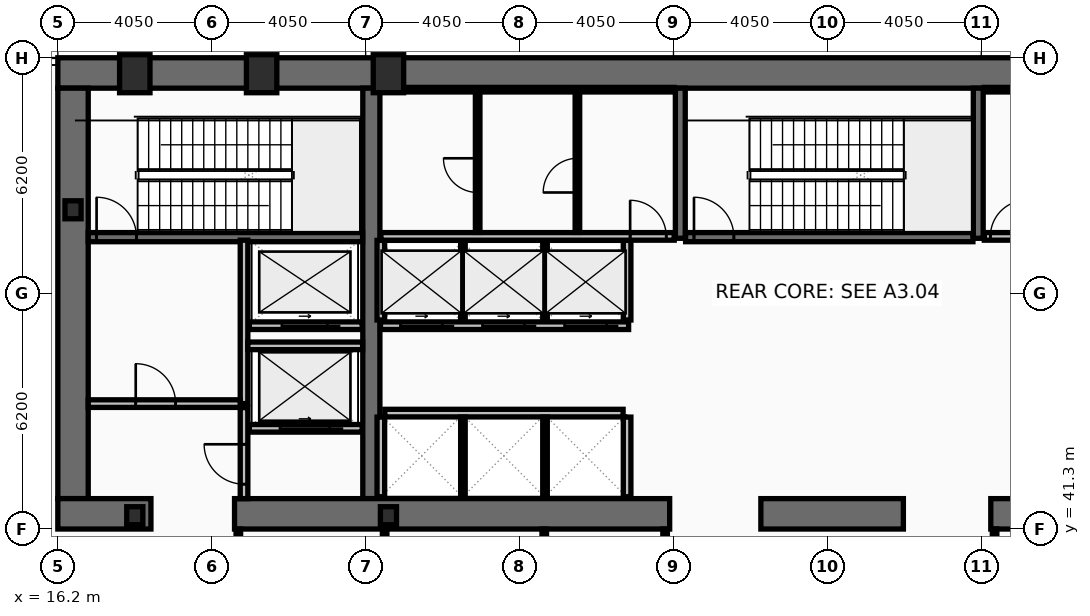
"""IFC4 building model, lengths in metres.
Left out: names, types, materials, properties, quantities, classifications, styles, units other than length and angle.
Written with IfcOpenShell. Run it as: python <this file> out.ifc"""

import sys

from ifc_helpers import new_model, si_unit, direction, frame, frame_2d, origin, origin_2d, place, context, subcontext, project, spatial, rectangle, hollow_rectangle, i_section, extrude, element, fill, save


model = new_model("IFC4")
c1 = context("Model", 3, precision=1e-05, world=origin(), true_north=direction((0.0, 1.0)))
c2 = subcontext(c1, "Body", "Model", "MODEL_VIEW")
j1 = project(units=[si_unit("LENGTHUNIT", "METRE"), si_unit("PLANEANGLEUNIT", "RADIAN")], contexts=[c1])
p1 = place(None, origin())
s1 = spatial("IfcSite", under=j1, at=p1, CompositionType="ELEMENT")
p2 = place(p1, origin())
s2 = spatial("IfcBuilding", under=s1, at=p2, CompositionType="ELEMENT")
p3 = place(p2, frame((0.0, 0.0, 10.4)))
s3 = spatial("IfcBuildingStorey", under=s2, at=p3, CompositionType="ELEMENT", Elevation=10.4)
p4 = place(p3, frame((16.2, 53.3, 0.0), z_axis=(0.0, 0.0, 1.0), x_axis=(1.0, 0.0, 0.0)))
e1 = element("IfcWall", 1, at=p4, inside=s3, PredefinedType="SHEAR", context=c2, shape_type="SweptSolid", body=[
    extrude(rectangle(XDim=40.5, YDim=0.8, at=frame_2d((20.25, 0.0))), origin(), (0.0, 0.0, 1.0), 4.8),
])
p5 = place(p3, frame((16.6, 42.1, 0.0), z_axis=(0.0, 0.0, 1.0), x_axis=(0.0, 1.0, 0.0)))
e2 = element("IfcWall", 2, at=p5, inside=s3, PredefinedType="SHEAR", context=c2, shape_type="SweptSolid", body=[
    extrude(rectangle(XDim=10.8, YDim=0.8, at=frame_2d((5.4, 0.0))), origin(), (0.0, 0.0, 1.0), 4.8),
])
p6 = place(p3, frame((24.45, 42.1, 0.0), z_axis=(0.0, 0.0, 1.0), x_axis=(0.0, 1.0, 0.0)))
e3 = element("IfcWall", 3, at=p6, inside=s3, PredefinedType="SHEAR", context=c2, shape_type="SweptSolid", body=[
    extrude(rectangle(XDim=10.8, YDim=0.45, at=frame_2d((5.4, 0.0))), origin(), (0.0, 0.0, 1.0), 4.8),
])
p7 = place(p3, frame((18.65, 41.7, 0.0), z_axis=(0.0, 0.0, 1.0), x_axis=(-1.0, 0.0, 0.0)))
e4 = element("IfcWall", 4, at=p7, inside=s3, PredefinedType="SHEAR", context=c2, shape_type="SweptSolid", body=[
    extrude(rectangle(XDim=2.45, YDim=0.8, at=frame_2d((1.225, 0.0))), origin(), (0.0, 0.0, 1.0), 4.8),
])
p8 = place(p3, frame((32.3, 41.7, 0.0), z_axis=(0.0, 0.0, 1.0), x_axis=(-1.0, 0.0, 0.0)))
e5 = element("IfcWall", 5, at=p8, inside=s3, PredefinedType="SHEAR", context=c2, shape_type="SweptSolid", body=[
    extrude(rectangle(XDim=11.45, YDim=0.8, at=frame_2d((5.725, 0.0))), origin(), (0.0, 0.0, 1.0), 4.8),
])
p9 = place(p3, frame((38.45, 41.7, 0.0), z_axis=(0.0, 0.0, 1.0), x_axis=(-1.0, 0.0, 0.0)))
e6 = element("IfcWall", 6, at=p9, inside=s3, PredefinedType="SHEAR", context=c2, shape_type="SweptSolid", body=[
    extrude(rectangle(XDim=3.75, YDim=0.8, at=frame_2d((1.875, 0.0))), origin(), (0.0, 0.0, 1.0), 4.8),
])
p10 = place(p3, frame((52.05, 41.7, 0.0), z_axis=(0.0, 0.0, 1.0), x_axis=(-1.0, 0.0, 0.0)))
e7 = element("IfcWall", 7, at=p10, inside=s3, PredefinedType="SHEAR", context=c2, shape_type="SweptSolid", body=[
    extrude(rectangle(XDim=11.3, YDim=0.8, at=frame_2d((5.65, 0.0))), origin(), (0.0, 0.0, 1.0), 4.8),
])
for number, where, z_axis, x_axis in (
    (8, (32.58, 48.95, 0.0), (0.0, 0.0, 1.0), (0.0, 1.0, 0.0)),
    (9, (40.42, 48.95, 0.0), (0.0, 0.0, 1.0), (0.0, 1.0, 0.0)),
):
    element("IfcWall", number, at=place(p3, frame(where, z_axis=z_axis, x_axis=x_axis)), inside=s3, PredefinedType="SHEAR", context=c2, shape_type="SweptSolid", body=[
        extrude(rectangle(XDim=3.95, YDim=0.26, at=frame_2d((1.975, 0.0))), origin(), (0.0, 0.0, 1.0), 4.8),
    ])
p11 = place(p3, frame((17.0, 48.98, 0.0), z_axis=(0.0, 0.0, 1.0), x_axis=(1.0, 0.0, 0.0)))
e10 = element("IfcWall", 10, at=p11, inside=s3, PredefinedType="SHEAR", context=c2, shape_type="SweptSolid", body=[
    extrude(rectangle(XDim=7.22, YDim=0.24, at=frame_2d((3.61, 0.0))), origin(), (0.0, 0.0, 1.0), 4.8),
])
p12 = place(p11, frame((0.22, 0.0, 0.0)))
e11 = element("IfcOpeningElement", 11, at=p12, cuts=e10, PredefinedType="OPENING", context=c2, shape_type="SweptSolid", body=[
    extrude(rectangle(XDim=1.05, YDim=2.15, at=frame_2d((0.525, 1.075))), frame((0.0, 0.13, 0.0), z_axis=(0.0, -1.0, 0.0), x_axis=(1.0, 0.0, 0.0)), (0.0, 0.0, 1.0), 0.26),
])
p13 = place(p3, frame((32.72, 48.98, 0.0), z_axis=(0.0, 0.0, 1.0), x_axis=(1.0, 0.0, 0.0)))
e12 = element("IfcWall", 12, at=p13, inside=s3, PredefinedType="SHEAR", context=c2, shape_type="SweptSolid", body=[
    extrude(rectangle(XDim=7.56, YDim=0.24, at=frame_2d((3.78, 0.0))), origin(), (0.0, 0.0, 1.0), 4.8),
])
p14 = place(p13, frame((0.22, 0.0, 0.0)))
e13 = element("IfcOpeningElement", 13, at=p14, cuts=e12, PredefinedType="OPENING", context=c2, shape_type="SweptSolid", body=[
    extrude(rectangle(XDim=1.05, YDim=2.15, at=frame_2d((0.525, 1.075))), frame((0.0, 0.13, 0.0), z_axis=(0.0, -1.0, 0.0), x_axis=(1.0, 0.0, 0.0)), (0.0, 0.0, 1.0), 0.26),
])
for number, where, z_axis, x_axis in (
    (14, (18.225, 53.28, 0.0), (0.0, 0.0, 1.0), (1.0, 0.0, 0.0)),
    (15, (21.562, 53.28, 0.0), (0.0, 0.0, 1.0), (1.0, 0.0, 0.0)),
    (16, (24.9, 53.28, 0.0), (0.0, 0.0, 1.0), (1.0, 0.0, 0.0)),
):
    element("IfcColumn", number, at=place(p3, frame(where, z_axis=z_axis, x_axis=x_axis)), inside=s3, PredefinedType="COLUMN", context=c2, shape_type="SweptSolid", body=[
        extrude(hollow_rectangle(XDim=0.8, YDim=1.0, WallThickness=0.055, at=origin_2d()), origin(), (0.0, 0.0, 1.0), 5.0),
    ])
for number, where, z_axis, x_axis in (
    (17, (16.6, 49.7, 0.0), (0.0, 0.0, 1.0), (1.0, 0.0, 0.0)),
    (18, (18.225, 41.65, 0.0), (0.0, 0.0, 1.0), (1.0, 0.0, 0.0)),
    (19, (24.9, 41.65, 0.0), (0.0, 0.0, 1.0), (1.0, 0.0, 0.0)),
):
    element("IfcColumn", number, at=place(p3, frame(where, z_axis=z_axis, x_axis=x_axis)), inside=s3, PredefinedType="COLUMN", context=c2, shape_type="SweptSolid", body=[
        extrude(i_section(OverallWidth=0.424, OverallDepth=0.474, WebThickness=0.048, FlangeThickness=0.077, at=origin_2d()), origin(), (0.0, 0.0, 1.0), 5.0),
    ])
p15 = place(p3, frame((24.21, 43.95, 0.0), z_axis=(0.0, 0.0, 1.0), x_axis=(-1.0, 0.0, 0.0)))
e20 = element("IfcWall", 20, at=p15, inside=s3, PredefinedType="PARTITIONING", context=c2, shape_type="SweptSolid", body=[
    extrude(rectangle(XDim=2.97, YDim=0.2, at=frame_2d((1.485, 0.0))), origin(), (0.0, 0.0, 1.0), 4.8),
])
p16 = place(p15, frame((0.86, 0.0, 0.0)))
e21 = element("IfcOpeningElement", 21, at=p16, cuts=e20, PredefinedType="OPENING", context=c2, shape_type="SweptSolid", body=[
    extrude(rectangle(XDim=1.3, YDim=2.18, at=frame_2d((0.65, 1.09))), frame((0.0, 0.11, 0.0), z_axis=(0.0, -1.0, 0.0), x_axis=(1.0, 0.0, 0.0)), (0.0, 0.0, 1.0), 0.22),
])
p17 = place(p3, frame((24.21, 46.65, 0.0), z_axis=(0.0, 0.0, 1.0), x_axis=(-1.0, 0.0, 0.0)))
e22 = element("IfcWall", 22, at=p17, inside=s3, PredefinedType="PARTITIONING", context=c2, shape_type="SweptSolid", body=[
    extrude(rectangle(XDim=2.97, YDim=0.2, at=frame_2d((1.485, 0.0))), origin(), (0.0, 0.0, 1.0), 4.8),
])
p18 = place(p17, frame((0.91, 0.0, 0.0)))
e23 = element("IfcOpeningElement", 23, at=p18, cuts=e22, PredefinedType="OPENING", context=c2, shape_type="SweptSolid", body=[
    extrude(rectangle(XDim=1.2, YDim=2.18, at=frame_2d((0.6, 1.09))), frame((0.0, 0.11, 0.0), z_axis=(0.0, -1.0, 0.0), x_axis=(1.0, 0.0, 0.0)), (0.0, 0.0, 1.0), 0.22),
])
p19 = place(p3, frame((31.22, 46.65, 0.0), z_axis=(0.0, 0.0, 1.0), x_axis=(-1.0, 0.0, 0.0)))
e24 = element("IfcWall", 24, at=p19, inside=s3, PredefinedType="PARTITIONING", context=c2, shape_type="SweptSolid", body=[
    extrude(rectangle(XDim=6.53, YDim=0.2, at=frame_2d((3.265, 0.0))), origin(), (0.0, 0.0, 1.0), 4.8),
])
p20 = place(p19, frame((4.9, 0.0, 0.0)))
e25 = element("IfcOpeningElement", 25, at=p20, cuts=e24, PredefinedType="OPENING", context=c2, shape_type="SweptSolid", body=[
    extrude(rectangle(XDim=1.1, YDim=2.18, at=frame_2d((0.55, 1.09))), frame((0.0, 0.11, 0.0), z_axis=(0.0, -1.0, 0.0), x_axis=(1.0, 0.0, 0.0)), (0.0, 0.0, 1.0), 0.22),
])
p21 = place(p19, frame((2.74, 0.0, 0.0)))
e26 = element("IfcOpeningElement", 26, at=p21, cuts=e24, PredefinedType="OPENING", context=c2, shape_type="SweptSolid", body=[
    extrude(rectangle(XDim=1.1, YDim=2.18, at=frame_2d((0.55, 1.09))), frame((0.0, 0.11, 0.0), z_axis=(0.0, -1.0, 0.0), x_axis=(1.0, 0.0, 0.0)), (0.0, 0.0, 1.0), 0.22),
])
p22 = place(p19, frame((0.58, 0.0, 0.0)))
e27 = element("IfcOpeningElement", 27, at=p22, cuts=e24, PredefinedType="OPENING", context=c2, shape_type="SweptSolid", body=[
    extrude(rectangle(XDim=1.1, YDim=2.18, at=frame_2d((0.55, 1.09))), frame((0.0, 0.11, 0.0), z_axis=(0.0, -1.0, 0.0), x_axis=(1.0, 0.0, 0.0)), (0.0, 0.0, 1.0), 0.22),
])
p23 = place(p3, frame((21.1, 44.6, 0.0), z_axis=(0.0, 0.0, 1.0), x_axis=(0.0, 1.0, 0.0)))
e28 = element("IfcWall", 28, at=p23, inside=s3, PredefinedType="PARTITIONING", context=c2, shape_type="SweptSolid", body=[
    extrude(rectangle(XDim=4.3, YDim=0.2, at=frame_2d((2.15, 0.0))), origin(), (0.0, 0.0, 1.0), 4.8),
])
p24 = place(p3, frame((17.0, 44.6, 0.0), z_axis=(0.0, 0.0, 1.0), x_axis=(1.0, 0.0, 0.0)))
e29 = element("IfcWall", 29, at=p24, inside=s3, PredefinedType="PARTITIONING", context=c2, shape_type="SweptSolid", body=[
    extrude(rectangle(XDim=4.0, YDim=0.2, at=frame_2d((2.0, 0.0))), origin(), (0.0, 0.0, 1.0), 4.8),
])
p25 = place(p24, frame((1.25, 0.0, 0.0)))
e30 = element("IfcOpeningElement", 30, at=p25, cuts=e29, PredefinedType="OPENING", context=c2, shape_type="SweptSolid", body=[
    extrude(rectangle(XDim=1.05, YDim=2.15, at=frame_2d((0.525, 1.075))), frame((0.0, 0.11, 0.0), z_axis=(0.0, -1.0, 0.0), x_axis=(1.0, 0.0, 0.0)), (0.0, 0.0, 1.0), 0.22),
])
p26 = place(p3, frame((21.2, 46.12, 0.0), z_axis=(0.0, 0.0, 1.0), x_axis=(1.0, 0.0, 0.0)))
e31 = element("IfcWall", 31, at=p26, inside=s3, PredefinedType="PARTITIONING", context=c2, shape_type="SweptSolid", body=[
    extrude(rectangle(XDim=3.02, YDim=0.2, at=frame_2d((1.51, 0.0))), origin(), (0.0, 0.0, 1.0), 4.8),
])
p27 = place(p3, frame((21.1, 42.1, 0.0), z_axis=(0.0, 0.0, 1.0), x_axis=(0.0, 1.0, 0.0)))
e32 = element("IfcWall", 32, at=p27, inside=s3, PredefinedType="PARTITIONING", context=c2, shape_type="SweptSolid", body=[
    extrude(rectangle(XDim=2.395, YDim=0.2, at=frame_2d((1.198, 0.0))), origin(), (0.0, 0.0, 1.0), 4.8),
])
p28 = place(p27, frame((0.38, 0.0, 0.0)))
e33 = element("IfcOpeningElement", 33, at=p28, cuts=e32, PredefinedType="OPENING", context=c2, shape_type="SweptSolid", body=[
    extrude(rectangle(XDim=1.05, YDim=2.15, at=frame_2d((0.525, 1.075))), frame((0.0, 0.11, 0.0), z_axis=(0.0, -1.0, 0.0), x_axis=(1.0, 0.0, 0.0)), (0.0, 0.0, 1.0), 0.22),
])
for number, where, z_axis, x_axis in (
    (34, (24.7, 46.8, 0.0), (0.0, 0.0, 1.0), (0.0, 1.0, 0.0)),
    (35, (31.18, 46.8, 0.0), (0.0, 0.0, 1.0), (0.0, 1.0, 0.0)),
):
    element("IfcWall", number, at=place(p3, frame(where, z_axis=z_axis, x_axis=x_axis)), inside=s3, PredefinedType="PARTITIONING", context=c2, shape_type="SweptSolid", body=[
        extrude(rectangle(XDim=2.095, YDim=0.2, at=frame_2d((1.047, 0.0))), origin(), (0.0, 0.0, 1.0), 4.8),
    ])
for number, where, z_axis, x_axis in (
    (36, (26.86, 46.8, 0.0), (0.0, 0.0, 1.0), (0.0, 1.0, 0.0)),
    (37, (29.02, 46.8, 0.0), (0.0, 0.0, 1.0), (0.0, 1.0, 0.0)),
):
    element("IfcWall", number, at=place(p3, frame(where, z_axis=z_axis, x_axis=x_axis)), inside=s3, PredefinedType="PARTITIONING", context=c2, shape_type="SweptSolid", body=[
        extrude(rectangle(XDim=2.095, YDim=0.12, at=frame_2d((1.047, 0.0))), origin(), (0.0, 0.0, 1.0), 4.8),
    ])
p29 = place(p3, frame((24.805, 44.35, 0.0), z_axis=(0.0, 0.0, 1.0), x_axis=(1.0, 0.0, 0.0)))
e38 = element("IfcWall", 38, at=p29, inside=s3, PredefinedType="PARTITIONING", context=c2, shape_type="SweptSolid", body=[
    extrude(rectangle(XDim=6.27, YDim=0.2, at=frame_2d((3.135, 0.0))), origin(), (0.0, 0.0, 1.0), 4.8),
])
for number, where, z_axis, x_axis in (
    (39, (24.7, 42.15, 0.0), (0.0, 0.0, 1.0), (0.0, 1.0, 0.0)),
    (40, (31.18, 42.15, 0.0), (0.0, 0.0, 1.0), (0.0, 1.0, 0.0)),
):
    element("IfcWall", number, at=place(p3, frame(where, z_axis=z_axis, x_axis=x_axis)), inside=s3, PredefinedType="PARTITIONING", context=c2, shape_type="SweptSolid", body=[
        extrude(rectangle(XDim=2.095, YDim=0.2, at=frame_2d((1.048, 0.0))), origin(), (0.0, 0.0, 1.0), 4.8),
    ])
for number, where, z_axis, x_axis in (
    (41, (26.86, 42.15, 0.0), (0.0, 0.0, 1.0), (0.0, 1.0, 0.0)),
    (42, (29.02, 42.15, 0.0), (0.0, 0.0, 1.0), (0.0, 1.0, 0.0)),
):
    element("IfcWall", number, at=place(p3, frame(where, z_axis=z_axis, x_axis=x_axis)), inside=s3, PredefinedType="PARTITIONING", context=c2, shape_type="SweptSolid", body=[
        extrude(rectangle(XDim=2.095, YDim=0.12, at=frame_2d((1.048, 0.0))), origin(), (0.0, 0.0, 1.0), 4.8),
    ])
p30 = place(p3, frame((24.7, 52.86, 0.0), z_axis=(0.0, 0.0, 1.0), x_axis=(1.0, 0.0, 0.0)))
e43 = element("IfcWall", 43, at=p30, inside=s3, PredefinedType="PARTITIONING", context=c2, shape_type="SweptSolid", body=[
    extrude(rectangle(XDim=7.72, YDim=0.12, at=frame_2d((3.86, 0.0))), origin(), (0.0, 0.0, 1.0), 4.8),
])
p31 = place(p3, frame((24.7, 49.0, 0.0), z_axis=(0.0, 0.0, 1.0), x_axis=(1.0, 0.0, 0.0)))
e44 = element("IfcWall", 44, at=p31, inside=s3, PredefinedType="PARTITIONING", context=c2, shape_type="SweptSolid", body=[
    extrude(rectangle(XDim=7.72, YDim=0.2, at=frame_2d((3.86, 0.0))), origin(), (0.0, 0.0, 1.0), 4.8),
])
p32 = place(p31, frame((6.56, 0.0, 0.0)))
e45 = element("IfcOpeningElement", 45, at=p32, cuts=e44, PredefinedType="OPENING", context=c2, shape_type="SweptSolid", body=[
    extrude(rectangle(XDim=0.95, YDim=2.1, at=frame_2d((0.475, 1.05))), frame((0.0, 0.11, 0.0), z_axis=(0.0, -1.0, 0.0), x_axis=(1.0, 0.0, 0.0)), (0.0, 0.0, 1.0), 0.22),
])
p33 = place(p3, frame((27.248, 49.105, 0.0), z_axis=(0.0, 0.0, 1.0), x_axis=(0.0, 1.0, 0.0)))
e46 = element("IfcWall", 46, at=p33, inside=s3, PredefinedType="PARTITIONING", context=c2, shape_type="SweptSolid", body=[
    extrude(rectangle(XDim=3.69, YDim=0.12, at=frame_2d((1.845, 0.0))), origin(), (0.0, 0.0, 1.0), 4.8),
])
p34 = place(p33, frame((1.05, 0.0, 0.0)))
e47 = element("IfcOpeningElement", 47, at=p34, cuts=e46, PredefinedType="OPENING", context=c2, shape_type="SweptSolid", body=[
    extrude(rectangle(XDim=0.9, YDim=2.05, at=frame_2d((0.45, 1.025))), frame((0.0, 0.07, 0.0), z_axis=(0.0, -1.0, 0.0), x_axis=(1.0, 0.0, 0.0)), (0.0, 0.0, 1.0), 0.14),
])
p35 = place(p3, frame((29.872, 49.105, 0.0), z_axis=(0.0, 0.0, 1.0), x_axis=(0.0, 1.0, 0.0)))
e48 = element("IfcWall", 48, at=p35, inside=s3, PredefinedType="PARTITIONING", context=c2, shape_type="SweptSolid", body=[
    extrude(rectangle(XDim=3.69, YDim=0.12, at=frame_2d((1.845, 0.0))), origin(), (0.0, 0.0, 1.0), 4.8),
])
p36 = place(p35, frame((1.05, 0.0, 0.0)))
e49 = element("IfcOpeningElement", 49, at=p36, cuts=e48, PredefinedType="OPENING", context=c2, shape_type="SweptSolid", body=[
    extrude(rectangle(XDim=0.9, YDim=2.05, at=frame_2d((0.45, 1.025))), frame((0.0, 0.07, 0.0), z_axis=(0.0, -1.0, 0.0), x_axis=(1.0, 0.0, 0.0)), (0.0, 0.0, 1.0), 0.14),
])
p37 = place(p3, frame((40.58, 52.86, 0.0), z_axis=(0.0, 0.0, 1.0), x_axis=(1.0, 0.0, 0.0)))
e50 = element("IfcWall", 50, at=p37, inside=s3, PredefinedType="PARTITIONING", context=c2, shape_type="SweptSolid", body=[
    extrude(rectangle(XDim=7.56, YDim=0.12, at=frame_2d((3.78, 0.0))), origin(), (0.0, 0.0, 1.0), 4.8),
])
p38 = place(p3, frame((40.58, 49.0, 0.0), z_axis=(0.0, 0.0, 1.0), x_axis=(1.0, 0.0, 0.0)))
e51 = element("IfcWall", 51, at=p38, inside=s3, PredefinedType="PARTITIONING", context=c2, shape_type="SweptSolid", body=[
    extrude(rectangle(XDim=7.56, YDim=0.2, at=frame_2d((3.78, 0.0))), origin(), (0.0, 0.0, 1.0), 4.8),
])
p39 = place(p38, frame((0.16, 0.0, 0.0)))
e52 = element("IfcOpeningElement", 52, at=p39, cuts=e51, PredefinedType="OPENING", context=c2, shape_type="SweptSolid", body=[
    extrude(rectangle(XDim=0.95, YDim=2.1, at=frame_2d((0.475, 1.05))), frame((0.0, 0.11, 0.0), z_axis=(0.0, -1.0, 0.0), x_axis=(1.0, 0.0, 0.0)), (0.0, 0.0, 1.0), 0.22),
])
p40 = place(p3, frame((20.95, 38.28, 0.0), z_axis=(0.0, 0.0, 1.0), x_axis=(0.0, 1.0, 0.0)))
e53 = element("IfcWall", 53, at=p40, inside=s3, PredefinedType="PARTITIONING", context=c2, shape_type="SweptSolid", body=[
    extrude(rectangle(XDim=3.02, YDim=0.12, at=frame_2d((1.51, 0.0))), origin(), (0.0, 0.0, 1.0), 4.8),
])
p41 = place(p3, frame((24.8, 38.28, 0.0), z_axis=(0.0, 0.0, 1.0), x_axis=(0.0, 1.0, 0.0)))
e54 = element("IfcWall", 54, at=p41, inside=s3, PredefinedType="PARTITIONING", context=c2, shape_type="SweptSolid", body=[
    extrude(rectangle(XDim=3.02, YDim=0.12, at=frame_2d((1.51, 0.0))), origin(), (0.0, 0.0, 1.0), 3.89),
])
for number, where, z_axis, x_axis in (
    (55, (29.0, 38.28, 0.0), (0.0, 0.0, 1.0), (0.0, 1.0, 0.0)),
    (56, (32.18, 38.28, 0.0), (0.0, 0.0, 1.0), (0.0, 1.0, 0.0)),
    (57, (40.85, 38.28, 0.0), (0.0, 0.0, 1.0), (0.0, 1.0, 0.0)),
):
    element("IfcWall", number, at=place(p3, frame(where, z_axis=z_axis, x_axis=x_axis)), inside=s3, PredefinedType="PARTITIONING", context=c2, shape_type="SweptSolid", body=[
        extrude(rectangle(XDim=3.02, YDim=0.12, at=frame_2d((1.51, 0.0))), origin(), (0.0, 0.0, 1.0), 4.8),
    ])
p42 = place(p12, origin())
e58 = element("IfcDoor", 58, at=p42, inside=s3, OperationType="SINGLE_SWING_LEFT", PredefinedType="DOOR", context=c2, shape_type="SweptSolid", body=[
    extrude(rectangle(XDim=1.05, YDim=2.15, at=frame_2d((0.525, 1.075))), frame((0.0, 0.025, 0.0), z_axis=(0.0, -1.0, 0.0), x_axis=(1.0, 0.0, 0.0)), (0.0, 0.0, 1.0), 0.05),
])
fill(e11, e58)
p43 = place(p14, origin())
e59 = element("IfcDoor", 59, at=p43, inside=s3, OperationType="SINGLE_SWING_LEFT", PredefinedType="DOOR", context=c2, shape_type="SweptSolid", body=[
    extrude(rectangle(XDim=1.05, YDim=2.15, at=frame_2d((0.525, 1.075))), frame((0.0, 0.025, 0.0), z_axis=(0.0, -1.0, 0.0), x_axis=(1.0, 0.0, 0.0)), (0.0, 0.0, 1.0), 0.05),
])
fill(e13, e59)
p44 = place(p16, origin())
e60 = element("IfcDoor", 60, at=p44, inside=s3, OperationType="SLIDING_TO_LEFT", PredefinedType="DOOR", context=c2, shape_type="SweptSolid", body=[
    extrude(rectangle(XDim=1.3, YDim=2.18, at=frame_2d((0.65, 1.09))), frame((0.0, 0.025, 0.0), z_axis=(0.0, -1.0, 0.0), x_axis=(1.0, 0.0, 0.0)), (0.0, 0.0, 1.0), 0.05),
])
fill(e21, e60)
p45 = place(p18, origin())
e61 = element("IfcDoor", 61, at=p45, inside=s3, OperationType="SLIDING_TO_LEFT", PredefinedType="DOOR", context=c2, shape_type="SweptSolid", body=[
    extrude(rectangle(XDim=1.2, YDim=2.18, at=frame_2d((0.6, 1.09))), frame((0.0, 0.025, 0.0), z_axis=(0.0, -1.0, 0.0), x_axis=(1.0, 0.0, 0.0)), (0.0, 0.0, 1.0), 0.05),
])
fill(e23, e61)
p46 = place(p20, origin())
e62 = element("IfcDoor", 62, at=p46, inside=s3, OperationType="SLIDING_TO_LEFT", PredefinedType="DOOR", context=c2, shape_type="SweptSolid", body=[
    extrude(rectangle(XDim=1.1, YDim=2.18, at=frame_2d((0.55, 1.09))), frame((0.0, 0.025, 0.0), z_axis=(0.0, -1.0, 0.0), x_axis=(1.0, 0.0, 0.0)), (0.0, 0.0, 1.0), 0.05),
])
fill(e25, e62)
p47 = place(p21, origin())
e63 = element("IfcDoor", 63, at=p47, inside=s3, OperationType="SLIDING_TO_LEFT", PredefinedType="DOOR", context=c2, shape_type="SweptSolid", body=[
    extrude(rectangle(XDim=1.1, YDim=2.18, at=frame_2d((0.55, 1.09))), frame((0.0, 0.025, 0.0), z_axis=(0.0, -1.0, 0.0), x_axis=(1.0, 0.0, 0.0)), (0.0, 0.0, 1.0), 0.05),
])
fill(e26, e63)
p48 = place(p22, origin())
e64 = element("IfcDoor", 64, at=p48, inside=s3, OperationType="SLIDING_TO_LEFT", PredefinedType="DOOR", context=c2, shape_type="SweptSolid", body=[
    extrude(rectangle(XDim=1.1, YDim=2.18, at=frame_2d((0.55, 1.09))), frame((0.0, 0.025, 0.0), z_axis=(0.0, -1.0, 0.0), x_axis=(1.0, 0.0, 0.0)), (0.0, 0.0, 1.0), 0.05),
])
fill(e27, e64)
p49 = place(p25, origin())
e65 = element("IfcDoor", 65, at=p49, inside=s3, OperationType="SINGLE_SWING_LEFT", PredefinedType="DOOR", context=c2, shape_type="SweptSolid", body=[
    extrude(rectangle(XDim=1.05, YDim=2.15, at=frame_2d((0.525, 1.075))), frame((0.0, 0.025, 0.0), z_axis=(0.0, -1.0, 0.0), x_axis=(1.0, 0.0, 0.0)), (0.0, 0.0, 1.0), 0.05),
])
fill(e30, e65)
p50 = place(p28, origin())
e66 = element("IfcDoor", 66, at=p50, inside=s3, OperationType="SINGLE_SWING_RIGHT", PredefinedType="DOOR", context=c2, shape_type="SweptSolid", body=[
    extrude(rectangle(XDim=1.05, YDim=2.15, at=frame_2d((0.525, 1.075))), frame((0.0, 0.025, 0.0), z_axis=(0.0, -1.0, 0.0), x_axis=(1.0, 0.0, 0.0)), (0.0, 0.0, 1.0), 0.05),
])
fill(e33, e66)
p51 = place(p32, origin())
e67 = element("IfcDoor", 67, at=p51, inside=s3, OperationType="SINGLE_SWING_LEFT", PredefinedType="DOOR", context=c2, shape_type="SweptSolid", body=[
    extrude(rectangle(XDim=0.95, YDim=2.1, at=frame_2d((0.475, 1.05))), frame((0.0, 0.025, 0.0), z_axis=(0.0, -1.0, 0.0), x_axis=(1.0, 0.0, 0.0)), (0.0, 0.0, 1.0), 0.05),
])
fill(e45, e67)
p52 = place(p34, origin())
e68 = element("IfcDoor", 68, at=p52, inside=s3, OperationType="SINGLE_SWING_RIGHT", PredefinedType="DOOR", context=c2, shape_type="SweptSolid", body=[
    extrude(rectangle(XDim=0.9, YDim=2.05, at=frame_2d((0.45, 1.025))), frame((0.0, 0.025, 0.0), z_axis=(0.0, -1.0, 0.0), x_axis=(1.0, 0.0, 0.0)), (0.0, 0.0, 1.0), 0.05),
])
fill(e47, e68)
p53 = place(p36, origin())
e69 = element("IfcDoor", 69, at=p53, inside=s3, OperationType="SINGLE_SWING_LEFT", PredefinedType="DOOR", context=c2, shape_type="SweptSolid", body=[
    extrude(rectangle(XDim=0.9, YDim=2.05, at=frame_2d((0.45, 1.025))), frame((0.0, 0.025, 0.0), z_axis=(0.0, -1.0, 0.0), x_axis=(1.0, 0.0, 0.0)), (0.0, 0.0, 1.0), 0.05),
])
fill(e49, e69)
p54 = place(p39, origin())
e70 = element("IfcDoor", 70, at=p54, inside=s3, OperationType="SINGLE_SWING_RIGHT", PredefinedType="DOOR", context=c2, shape_type="SweptSolid", body=[
    extrude(rectangle(XDim=0.95, YDim=2.1, at=frame_2d((0.475, 1.05))), frame((0.0, 0.025, 0.0), z_axis=(0.0, -1.0, 0.0), x_axis=(1.0, 0.0, 0.0)), (0.0, 0.0, 1.0), 0.05),
])
fill(e52, e70)
save(model, sys.argv[1])
